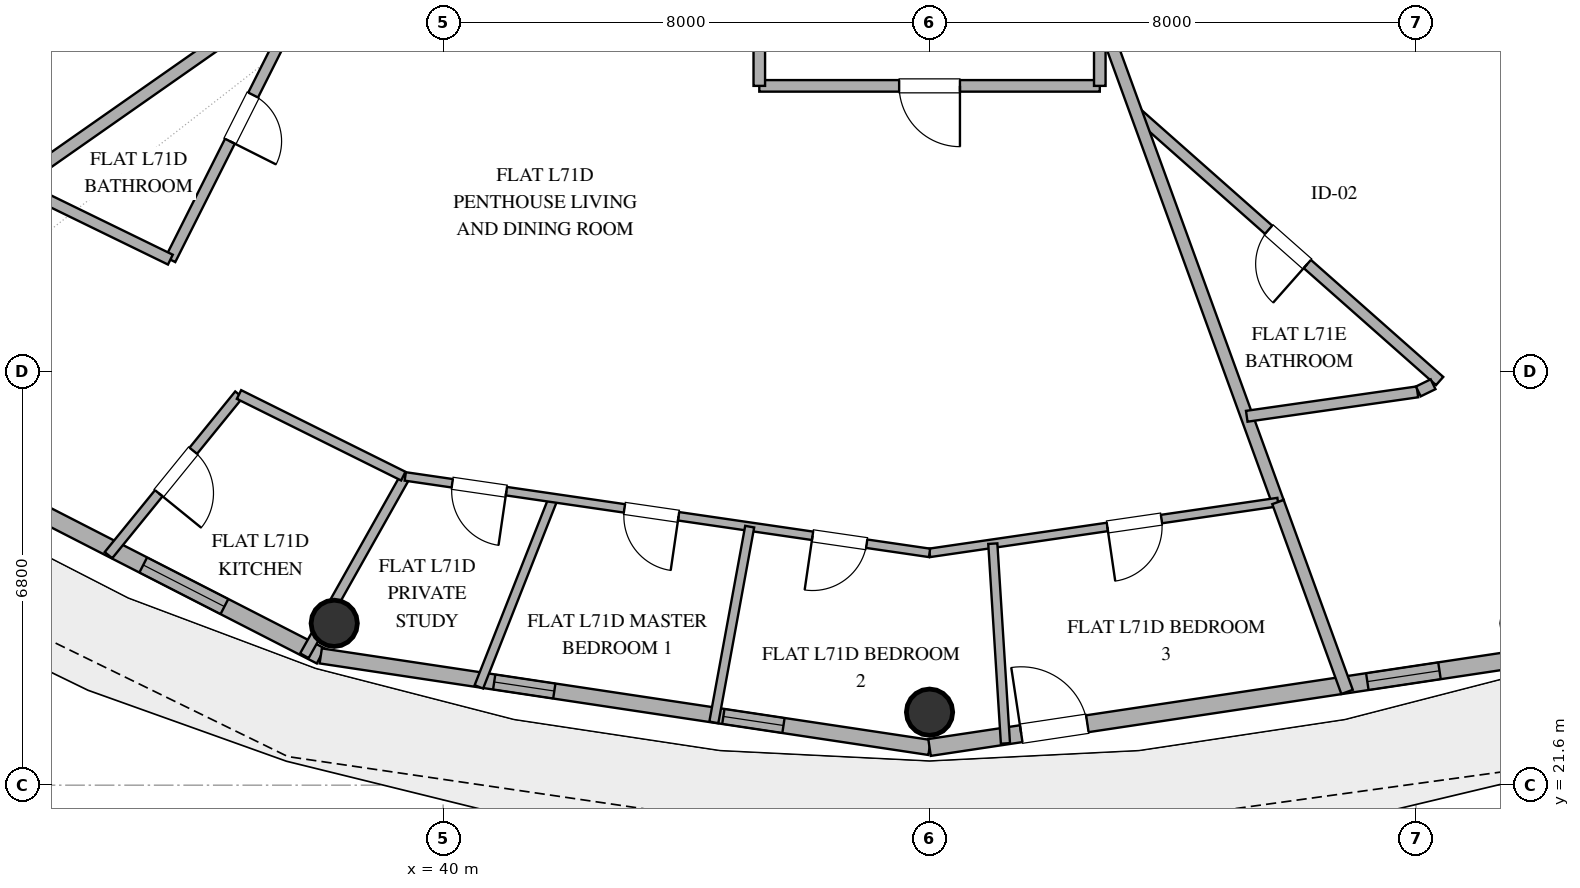
"""IFC4 building model, lengths in metres.
Left out: names, types, materials, properties, quantities, classifications, styles, units other than length and angle.
Written with IfcOpenShell. Run it as: python <this file> out.ifc"""

import sys

from ifc_helpers import new_model, si_unit, direction, frame, frame_2d, origin, origin_2d, place, context, subcontext, project, spatial, rectangle, hollow_circle, extrude, element, fill, save


model = new_model("IFC4")
c1 = context("Model", 3, precision=1e-05, world=origin(), true_north=direction((0.0, 1.0)))
c2 = subcontext(c1, "Body", "Model", "MODEL_VIEW")
j1 = project(units=[si_unit("LENGTHUNIT", "METRE"), si_unit("PLANEANGLEUNIT", "RADIAN")], contexts=[c1])
p1 = place(None, origin())
s1 = spatial("IfcSite", under=j1, at=p1, CompositionType="ELEMENT")
p2 = place(p1, origin())
s2 = spatial("IfcBuilding", under=s1, at=p2, CompositionType="ELEMENT")
p3 = place(p2, frame((0.0, 0.0, 276.6)))
s3 = spatial("IfcBuildingStorey", under=s2, at=p3, CompositionType="ELEMENT", Elevation=276.6)
for number, where, z_axis, x_axis in (
    (1, (38.209, 24.261, 0.0), (0.0, 0.0, 1.0), (1.0, 0.0, 0.0)),
    (2, (48.0, 22.8, 0.0), (0.0, 0.0, 1.0), (1.0, 0.0, 0.0)),
):
    element("IfcColumn", number, at=place(p3, frame(where, z_axis=z_axis, x_axis=x_axis)), inside=s3, PredefinedType="COLUMN", context=c2, shape_type="SweptSolid", body=[
        extrude(hollow_circle(Radius=0.381, WallThickness=0.025, at=origin_2d()), origin(), (0.0, 0.0, 1.0), 3.37),
    ])
p4 = place(p3, frame((29.617, 28.013, 0.0), z_axis=(0.0, 0.0, 1.0), x_axis=(0.890007394051, -0.455946091699, 0.0)))
e3 = element("IfcWall", 3, at=p4, inside=s3, PredefinedType="SOLIDWALL", context=c2, shape_type="SweptSolid", body=[
    extrude(rectangle(XDim=9.404, YDim=0.28, at=frame_2d((4.702, 0.0))), origin(), (0.0, 0.0, 1.0), 3.37),
])
p5 = place(p4, frame((2.609, 0.0, 0.85)))
e4 = element("IfcOpeningElement", 4, at=p5, cuts=e3, PredefinedType="OPENING", context=c2, shape_type="SweptSolid", body=[
    extrude(rectangle(XDim=1.65, YDim=2.0, at=frame_2d((0.825, 1.0))), frame((0.0, 0.15, 0.0), z_axis=(0.0, -1.0, 0.0), x_axis=(1.0, 0.0, 0.0)), (0.0, 0.0, 1.0), 0.3),
])
p6 = place(p4, frame((6.125, 0.0, 0.85)))
e5 = element("IfcOpeningElement", 5, at=p6, cuts=e3, PredefinedType="OPENING", context=c2, shape_type="SweptSolid", body=[
    extrude(rectangle(XDim=1.5, YDim=2.0, at=frame_2d((0.75, 1.0))), frame((0.0, 0.15, 0.0), z_axis=(0.0, -1.0, 0.0), x_axis=(1.0, 0.0, 0.0)), (0.0, 0.0, 1.0), 0.3),
])
p7 = place(p3, frame((37.987, 23.726, 0.0), z_axis=(0.0, 0.0, 1.0), x_axis=(0.988882522213, -0.148698881169, 0.0)))
e6 = element("IfcWall", 6, at=p7, inside=s3, PredefinedType="SOLIDWALL", context=c2, shape_type="SweptSolid", body=[
    extrude(rectangle(XDim=10.125, YDim=0.25, at=frame_2d((5.062, 0.0))), origin(), (0.0, 0.0, 1.0), 3.37),
])
p8 = place(p7, frame((2.885, 0.0, 0.35)))
e7 = element("IfcOpeningElement", 7, at=p8, cuts=e6, PredefinedType="OPENING", context=c2, shape_type="SweptSolid", body=[
    extrude(rectangle(XDim=1.0, YDim=1.05, at=frame_2d((0.5, 0.525))), frame((0.0, 0.135, 0.0), z_axis=(0.0, -1.0, 0.0), x_axis=(1.0, 0.0, 0.0)), (0.0, 0.0, 1.0), 0.27),
])
p9 = place(p7, frame((6.696, 0.0, 1.42)))
e8 = element("IfcOpeningElement", 8, at=p9, cuts=e6, PredefinedType="OPENING", context=c2, shape_type="SweptSolid", body=[
    extrude(rectangle(XDim=1.0, YDim=1.05, at=frame_2d((0.5, 0.525))), frame((0.0, 0.135, 0.0), z_axis=(0.0, -1.0, 0.0), x_axis=(1.0, 0.0, 0.0)), (0.0, 0.0, 1.0), 0.27),
])
p10 = place(p3, frame((48.0, 22.22, 0.0), z_axis=(0.0, 0.0, 1.0), x_axis=(0.988882522213, 0.148698881169, 0.0)))
e9 = element("IfcWall", 9, at=p10, inside=s3, PredefinedType="SOLIDWALL", context=c2, shape_type="SweptSolid", body=[
    extrude(rectangle(XDim=10.125, YDim=0.28, at=frame_2d((5.062, 0.0))), origin(), (0.0, 0.0, 1.0), 3.37),
])
p11 = place(p10, frame((1.524, 0.0, 0.0)))
e10 = element("IfcOpeningElement", 10, at=p11, cuts=e9, PredefinedType="OPENING", context=c2, shape_type="SweptSolid", body=[
    extrude(rectangle(XDim=1.1, YDim=2.25, at=frame_2d((0.55, 1.125))), frame((0.0, 0.15, 0.0), z_axis=(0.0, -1.0, 0.0), x_axis=(1.0, 0.0, 0.0)), (0.0, 0.0, 1.0), 0.3),
])
p12 = place(p10, frame((7.281, 0.0, 0.85)))
e11 = element("IfcOpeningElement", 11, at=p12, cuts=e9, PredefinedType="OPENING", context=c2, shape_type="SweptSolid", body=[
    extrude(rectangle(XDim=1.2, YDim=1.8, at=frame_2d((0.6, 0.9))), frame((0.0, 0.15, 0.0), z_axis=(0.0, -1.0, 0.0), x_axis=(1.0, 0.0, 0.0)), (0.0, 0.0, 1.0), 0.3),
])
p13 = place(p3, frame((56.389, 28.246, 0.0), z_axis=(0.0, 0.0, 1.0), x_axis=(-0.749087509224, 0.662471058632, 0.0)))
e12 = element("IfcWall", 12, at=p13, inside=s3, PredefinedType="PLUMBINGWALL", context=c2, shape_type="SweptSolid", body=[
    extrude(rectangle(XDim=6.66, YDim=0.18, at=frame_2d((3.33, 0.0))), origin(), (0.0, 0.0, 1.0), 2.73),
])
p14 = place(p13, frame((2.905, 0.0, 0.0)))
e13 = element("IfcOpeningElement", 13, at=p14, cuts=e12, PredefinedType="OPENING", context=c2, shape_type="SweptSolid", body=[
    extrude(rectangle(XDim=0.85, YDim=2.1, at=frame_2d((0.425, 1.05))), frame((0.0, 0.1, 0.0), z_axis=(0.0, -1.0, 0.0), x_axis=(1.0, 0.0, 0.0)), (0.0, 0.0, 1.0), 0.2),
])
p15 = place(p3, frame((50.8, 33.1, 0.0), z_axis=(0.0, 0.0, 1.0), x_axis=(-1.0, 0.0, 0.0)))
e14 = element("IfcWall", 14, at=p15, inside=s3, PredefinedType="PARTITIONING", context=c2, shape_type="SweptSolid", body=[
    extrude(rectangle(XDim=5.6, YDim=0.19, at=frame_2d((2.8, 0.0))), origin(), (0.0, 0.0, 1.0), 2.73),
])
p16 = place(p15, frame((2.3, 0.0, 0.0)))
e15 = element("IfcOpeningElement", 15, at=p16, cuts=e14, PredefinedType="OPENING", context=c2, shape_type="SweptSolid", body=[
    extrude(rectangle(XDim=1.0, YDim=2.2, at=frame_2d((0.5, 1.1))), frame((0.0, 0.105, 0.0), z_axis=(0.0, -1.0, 0.0), x_axis=(1.0, 0.0, 0.0)), (0.0, 0.0, 1.0), 0.21),
])
p17 = place(p3, frame((50.8, 34.307, 0.0), z_axis=(0.0, 0.0, 1.0), x_axis=(0.342010724278, -0.939696048985, 0.0)))
e16 = element("IfcWall", 16, at=p17, inside=s3, PredefinedType="PARTITIONING", context=c2, shape_type="SweptSolid", body=[
    extrude(rectangle(XDim=8.568, YDim=0.2, at=frame_2d((4.284, 0.0))), origin(), (0.0, 0.0, 1.0), 2.73),
])
p18 = place(p3, frame((37.855, 34.896, 0.0), z_axis=(0.0, 0.0, 1.0), x_axis=(-0.449274589412, -0.893393722447, 0.0)))
e17 = element("IfcWall", 17, at=p18, inside=s3, PredefinedType="PLUMBINGWALL", context=c2, shape_type="SweptSolid", body=[
    extrude(rectangle(XDim=5.209, YDim=0.18, at=frame_2d((2.604, 0.0))), origin(), (0.0, 0.0, 1.0), 2.73),
])
p19 = place(p18, frame((2.18, 0.0, 0.0)))
e18 = element("IfcOpeningElement", 18, at=p19, cuts=e17, PredefinedType="OPENING", context=c2, shape_type="SweptSolid", body=[
    extrude(rectangle(XDim=0.85, YDim=2.1, at=frame_2d((0.425, 1.05))), frame((0.0, 0.1, 0.0), z_axis=(0.0, -1.0, 0.0), x_axis=(1.0, 0.0, 0.0)), (0.0, 0.0, 1.0), 0.2),
])
p20 = place(p3, frame((36.575, 34.0, 0.0), z_axis=(0.0, 0.0, 1.0), x_axis=(-0.819138444565, -0.57359585828, 0.0)))
e19 = element("IfcWall", 19, at=p20, inside=s3, PredefinedType="PARTITIONING", context=c2, shape_type="SweptSolid", body=[
    extrude(rectangle(XDim=9.326, YDim=0.2, at=frame_2d((4.663, 0.0))), origin(), (0.0, 0.0, 1.0), 2.73),
])
p21 = place(p3, frame((53.73, 26.256, 0.0), z_axis=(0.0, 0.0, 1.0), x_axis=(-0.989539000253, -0.144265612597, 0.0)))
e20 = element("IfcWall", 20, at=p21, inside=s3, PredefinedType="PARTITIONING", context=c2, shape_type="SweptSolid", body=[
    extrude(rectangle(XDim=5.791, YDim=0.14, at=frame_2d((2.896, 0.0))), origin(), (0.0, 0.0, 1.0), 2.73),
])
p22 = place(p21, frame((1.936, 0.0, 0.0)))
e21 = element("IfcOpeningElement", 21, at=p22, cuts=e20, PredefinedType="OPENING", context=c2, shape_type="SweptSolid", body=[
    extrude(rectangle(XDim=0.9, YDim=2.1, at=frame_2d((0.45, 1.05))), frame((0.0, 0.08, 0.0), z_axis=(0.0, -1.0, 0.0), x_axis=(1.0, 0.0, 0.0)), (0.0, 0.0, 1.0), 0.16),
])
p23 = place(p3, frame((36.643, 28.024, 0.0), z_axis=(0.0, 0.0, 1.0), x_axis=(-0.630641219738, -0.776074514442, 0.0)))
e22 = element("IfcWall", 22, at=p23, inside=s3, PredefinedType="PLUMBINGWALL", context=c2, shape_type="SweptSolid", body=[
    extrude(rectangle(XDim=3.405, YDim=0.16, at=frame_2d((1.702, 0.0))), origin(), (0.0, 0.0, 1.0), 2.73),
])
p24 = place(p23, frame((1.192, 0.0, 0.0)))
e23 = element("IfcOpeningElement", 23, at=p24, cuts=e22, PredefinedType="OPENING", context=c2, shape_type="SweptSolid", body=[
    extrude(rectangle(XDim=0.9, YDim=2.1, at=frame_2d((0.45, 1.05))), frame((0.0, 0.09, 0.0), z_axis=(0.0, -1.0, 0.0), x_axis=(1.0, 0.0, 0.0)), (0.0, 0.0, 1.0), 0.18),
])
p25 = place(p3, frame((37.719, 23.729, 0.0), z_axis=(0.0, 0.0, 1.0), x_axis=(0.490408553136, 0.871492656889, 0.0)))
e24 = element("IfcWall", 24, at=p25, inside=s3, PredefinedType="PLUMBINGWALL", context=c2, shape_type="SweptSolid", body=[
    extrude(rectangle(XDim=3.383, YDim=0.16, at=frame_2d((1.692, 0.0))), origin(), (0.0, 0.0, 1.0), 2.73),
])
p26 = place(p3, frame((41.813, 26.322, 0.0), z_axis=(0.0, 0.0, 1.0), x_axis=(-0.366986730156, -0.930226176738, 0.0)))
e25 = element("IfcWall", 25, at=p26, inside=s3, PredefinedType="PARTITIONING", context=c2, shape_type="SweptSolid", body=[
    extrude(rectangle(XDim=3.339, YDim=0.15, at=frame_2d((1.669, 0.0))), origin(), (0.0, 0.0, 1.0), 2.73),
])
p27 = place(p3, frame((48.0, 25.42, 0.0), z_axis=(0.0, 0.0, 1.0), x_axis=(-0.989534564718, 0.144296033307, 0.0)))
e26 = element("IfcWall", 26, at=p27, inside=s3, PredefinedType="PARTITIONING", context=c2, shape_type="SweptSolid", body=[
    extrude(rectangle(XDim=8.714, YDim=0.14, at=frame_2d((4.357, 0.0))), origin(), (0.0, 0.0, 1.0), 2.73),
])
p28 = place(p27, frame((4.171, 0.0, 0.0)))
e27 = element("IfcOpeningElement", 27, at=p28, cuts=e26, PredefinedType="OPENING", context=c2, shape_type="SweptSolid", body=[
    extrude(rectangle(XDim=0.9, YDim=2.1, at=frame_2d((0.45, 1.05))), frame((0.0, 0.08, 0.0), z_axis=(0.0, -1.0, 0.0), x_axis=(1.0, 0.0, 0.0)), (0.0, 0.0, 1.0), 0.16),
])
p29 = place(p27, frame((1.045, 0.0, 0.0)))
e28 = element("IfcOpeningElement", 28, at=p29, cuts=e26, PredefinedType="OPENING", context=c2, shape_type="SweptSolid", body=[
    extrude(rectangle(XDim=0.9, YDim=2.1, at=frame_2d((0.45, 1.05))), frame((0.0, 0.08, 0.0), z_axis=(0.0, -1.0, 0.0), x_axis=(1.0, 0.0, 0.0)), (0.0, 0.0, 1.0), 0.16),
])
p30 = place(p27, frame((7.033, 0.0, 0.0)))
e29 = element("IfcOpeningElement", 29, at=p30, cuts=e26, PredefinedType="OPENING", context=c2, shape_type="SweptSolid", body=[
    extrude(rectangle(XDim=0.9, YDim=2.1, at=frame_2d((0.45, 1.05))), frame((0.0, 0.08, 0.0), z_axis=(0.0, -1.0, 0.0), x_axis=(1.0, 0.0, 0.0)), (0.0, 0.0, 1.0), 0.16),
])
p31 = place(p3, frame((53.73, 26.256, 0.0), z_axis=(0.0, 0.0, 1.0), x_axis=(0.341990855898, -0.939703280021, 0.0)))
e30 = element("IfcWall", 30, at=p31, inside=s3, PredefinedType="PARTITIONING", context=c2, shape_type="SweptSolid", body=[
    extrude(rectangle(XDim=3.323, YDim=0.2, at=frame_2d((1.661, 0.0))), origin(), (0.0, 0.0, 1.0), 2.73),
])
p32 = place(p3, frame((49.04, 25.572, 0.0), z_axis=(0.0, 0.0, 1.0), x_axis=(0.063195614113, -0.998001159497, 0.0)))
e31 = element("IfcWall", 31, at=p32, inside=s3, PredefinedType="PARTITIONING", context=c2, shape_type="SweptSolid", body=[
    extrude(rectangle(XDim=3.292, YDim=0.15, at=frame_2d((1.646, 0.0))), origin(), (0.0, 0.0, 1.0), 2.73),
])
p33 = place(p3, frame((44.452, 22.632, 0.0), z_axis=(0.0, 0.0, 1.0), x_axis=(0.180152248802, 0.983638738182, 0.0)))
e32 = element("IfcWall", 32, at=p33, inside=s3, PredefinedType="PARTITIONING", context=c2, shape_type="SweptSolid", body=[
    extrude(rectangle(XDim=3.273, YDim=0.15, at=frame_2d((1.636, 0.0))), origin(), (0.0, 0.0, 1.0), 2.73),
])
p34 = place(p3, frame((39.345, 26.682, 0.0), z_axis=(0.0, 0.0, 1.0), x_axis=(-0.895589359885, 0.44488166793, 0.0)))
e33 = element("IfcWall", 33, at=p34, inside=s3, PredefinedType="PLUMBINGWALL", context=c2, shape_type="SweptSolid", body=[
    extrude(rectangle(XDim=3.017, YDim=0.16, at=frame_2d((1.509, 0.0))), origin(), (0.0, 0.0, 1.0), 2.73),
])
p35 = place(p3, frame((53.217, 27.666, 0.0), z_axis=(0.0, 0.0, 1.0), x_axis=(0.989918473044, 0.141638330709, 0.0)))
e34 = element("IfcWall", 34, at=p35, inside=s3, PredefinedType="PLUMBINGWALL", context=c2, shape_type="SweptSolid", body=[
    extrude(rectangle(XDim=2.835, YDim=0.18, at=frame_2d((1.418, 0.0))), origin(), (0.0, 0.0, 1.0), 2.73),
])
p36 = place(p3, frame((35.514, 30.242, 0.0), z_axis=(0.0, 0.0, 1.0), x_axis=(-0.898915857852, 0.438121307975, 0.0)))
e35 = element("IfcWall", 35, at=p36, inside=s3, PredefinedType="PLUMBINGWALL", context=c2, shape_type="SweptSolid", body=[
    extrude(rectangle(XDim=2.498, YDim=0.18, at=frame_2d((1.249, 0.0))), origin(), (0.0, 0.0, 1.0), 2.73),
])
for number, where, z_axis, x_axis in (
    (36, (45.2, 33.1, 0.0), (0.0, 0.0, 1.0), (0.0, 1.0, 0.0)),
    (37, (50.8, 35.2, 0.0), (0.0, 0.0, 1.0), (0.0, -1.0, 0.0)),
):
    element("IfcWall", number, at=place(p3, frame(where, z_axis=z_axis, x_axis=x_axis)), inside=s3, PredefinedType="PARTITIONING", context=c2, shape_type="SweptSolid", body=[
        extrude(rectangle(XDim=2.1, YDim=0.19, at=frame_2d((1.05, 0.0))), origin(), (0.0, 0.0, 1.0), 2.73),
    ])
p37 = place(p3, frame((56.038, 28.075, 0.0), z_axis=(0.0, 0.0, 1.0), x_axis=(0.899071871525, 0.437801061937, 0.0)))
e38 = element("IfcWall", 38, at=p37, inside=s3, PredefinedType="PLUMBINGWALL", context=c2, shape_type="SweptSolid", body=[
    extrude(rectangle(XDim=0.271, YDim=0.18, at=frame_2d((0.135, 0.0))), origin(), (0.0, 0.0, 1.0), 2.73),
])
p38 = place(p6, origin())
e39 = element("IfcWindow", 39, at=p38, inside=s3, PartitioningType="SINGLE_PANEL", PredefinedType="WINDOW", context=c2, shape_type="SweptSolid", body=[
    extrude(rectangle(XDim=1.5, YDim=2.0, at=frame_2d((0.75, 1.0))), frame((0.0, 0.03, 0.0), z_axis=(0.0, -1.0, 0.0), x_axis=(1.0, 0.0, 0.0)), (0.0, 0.0, 1.0), 0.06),
])
fill(e5, e39)
p39 = place(p11, origin())
e40 = element("IfcDoor", 40, at=p39, inside=s3, OperationType="SINGLE_SWING_LEFT", PredefinedType="DOOR", context=c2, shape_type="SweptSolid", body=[
    extrude(rectangle(XDim=1.1, YDim=2.25, at=frame_2d((0.55, 1.125))), frame((0.0, 0.025, 0.0), z_axis=(0.0, -1.0, 0.0), x_axis=(1.0, 0.0, 0.0)), (0.0, 0.0, 1.0), 0.05),
])
fill(e10, e40)
p40 = place(p12, origin())
e41 = element("IfcWindow", 41, at=p40, inside=s3, PartitioningType="SINGLE_PANEL", PredefinedType="WINDOW", context=c2, shape_type="SweptSolid", body=[
    extrude(rectangle(XDim=1.2, YDim=1.8, at=frame_2d((0.6, 0.9))), frame((0.0, 0.03, 0.0), z_axis=(0.0, -1.0, 0.0), x_axis=(1.0, 0.0, 0.0)), (0.0, 0.0, 1.0), 0.06),
])
fill(e11, e41)
p41 = place(p8, origin())
e42 = element("IfcWindow", 42, at=p41, inside=s3, PartitioningType="SINGLE_PANEL", PredefinedType="WINDOW", context=c2, shape_type="SweptSolid", body=[
    extrude(rectangle(XDim=1.0, YDim=1.05, at=frame_2d((0.5, 0.525))), frame((0.0, 0.03, 0.0), z_axis=(0.0, -1.0, 0.0), x_axis=(1.0, 0.0, 0.0)), (0.0, 0.0, 1.0), 0.06),
])
fill(e7, e42)
p42 = place(p9, origin())
e43 = element("IfcWindow", 43, at=p42, inside=s3, PartitioningType="SINGLE_PANEL", PredefinedType="WINDOW", context=c2, shape_type="SweptSolid", body=[
    extrude(rectangle(XDim=1.0, YDim=1.05, at=frame_2d((0.5, 0.525))), frame((0.0, 0.03, 0.0), z_axis=(0.0, -1.0, 0.0), x_axis=(1.0, 0.0, 0.0)), (0.0, 0.0, 1.0), 0.06),
])
fill(e8, e43)
p43 = place(p14, origin())
e44 = element("IfcDoor", 44, at=p43, inside=s3, OperationType="SINGLE_SWING_LEFT", PredefinedType="DOOR", context=c2, shape_type="SweptSolid", body=[
    extrude(rectangle(XDim=0.85, YDim=2.1, at=frame_2d((0.425, 1.05))), frame((0.0, 0.025, 0.0), z_axis=(0.0, -1.0, 0.0), x_axis=(1.0, 0.0, 0.0)), (0.0, 0.0, 1.0), 0.05),
])
fill(e13, e44)
p44 = place(p16, origin())
e45 = element("IfcDoor", 45, at=p44, inside=s3, OperationType="SINGLE_SWING_LEFT", PredefinedType="DOOR", context=c2, shape_type="SweptSolid", body=[
    extrude(rectangle(XDim=1.0, YDim=2.2, at=frame_2d((0.5, 1.1))), frame((0.0, 0.025, 0.0), z_axis=(0.0, -1.0, 0.0), x_axis=(1.0, 0.0, 0.0)), (0.0, 0.0, 1.0), 0.05),
])
fill(e15, e45)
p45 = place(p19, origin())
e46 = element("IfcDoor", 46, at=p45, inside=s3, OperationType="SINGLE_SWING_RIGHT", PredefinedType="DOOR", context=c2, shape_type="SweptSolid", body=[
    extrude(rectangle(XDim=0.85, YDim=2.1, at=frame_2d((0.425, 1.05))), frame((0.0, 0.025, 0.0), z_axis=(0.0, -1.0, 0.0), x_axis=(1.0, 0.0, 0.0)), (0.0, 0.0, 1.0), 0.05),
])
fill(e18, e46)
p46 = place(p22, origin())
e47 = element("IfcDoor", 47, at=p46, inside=s3, OperationType="SINGLE_SWING_RIGHT", PredefinedType="DOOR", context=c2, shape_type="SweptSolid", body=[
    extrude(rectangle(XDim=0.9, YDim=2.1, at=frame_2d((0.45, 1.05))), frame((0.0, 0.025, 0.0), z_axis=(0.0, -1.0, 0.0), x_axis=(1.0, 0.0, 0.0)), (0.0, 0.0, 1.0), 0.05),
])
fill(e21, e47)
p47 = place(p24, origin())
e48 = element("IfcDoor", 48, at=p47, inside=s3, OperationType="SINGLE_SWING_RIGHT", PredefinedType="DOOR", context=c2, shape_type="SweptSolid", body=[
    extrude(rectangle(XDim=0.9, YDim=2.1, at=frame_2d((0.45, 1.05))), frame((0.0, 0.025, 0.0), z_axis=(0.0, -1.0, 0.0), x_axis=(1.0, 0.0, 0.0)), (0.0, 0.0, 1.0), 0.05),
])
fill(e23, e48)
p48 = place(p28, origin())
e49 = element("IfcDoor", 49, at=p48, inside=s3, OperationType="SINGLE_SWING_LEFT", PredefinedType="DOOR", context=c2, shape_type="SweptSolid", body=[
    extrude(rectangle(XDim=0.9, YDim=2.1, at=frame_2d((0.45, 1.05))), frame((0.0, 0.025, 0.0), z_axis=(0.0, -1.0, 0.0), x_axis=(1.0, 0.0, 0.0)), (0.0, 0.0, 1.0), 0.05),
])
fill(e27, e49)
p49 = place(p29, origin())
e50 = element("IfcDoor", 50, at=p49, inside=s3, OperationType="SINGLE_SWING_RIGHT", PredefinedType="DOOR", context=c2, shape_type="SweptSolid", body=[
    extrude(rectangle(XDim=0.9, YDim=2.1, at=frame_2d((0.45, 1.05))), frame((0.0, 0.025, 0.0), z_axis=(0.0, -1.0, 0.0), x_axis=(1.0, 0.0, 0.0)), (0.0, 0.0, 1.0), 0.05),
])
fill(e28, e50)
p50 = place(p30, origin())
e51 = element("IfcDoor", 51, at=p50, inside=s3, OperationType="SINGLE_SWING_LEFT", PredefinedType="DOOR", context=c2, shape_type="SweptSolid", body=[
    extrude(rectangle(XDim=0.9, YDim=2.1, at=frame_2d((0.45, 1.05))), frame((0.0, 0.025, 0.0), z_axis=(0.0, -1.0, 0.0), x_axis=(1.0, 0.0, 0.0)), (0.0, 0.0, 1.0), 0.05),
])
fill(e29, e51)
save(model, sys.argv[1])
